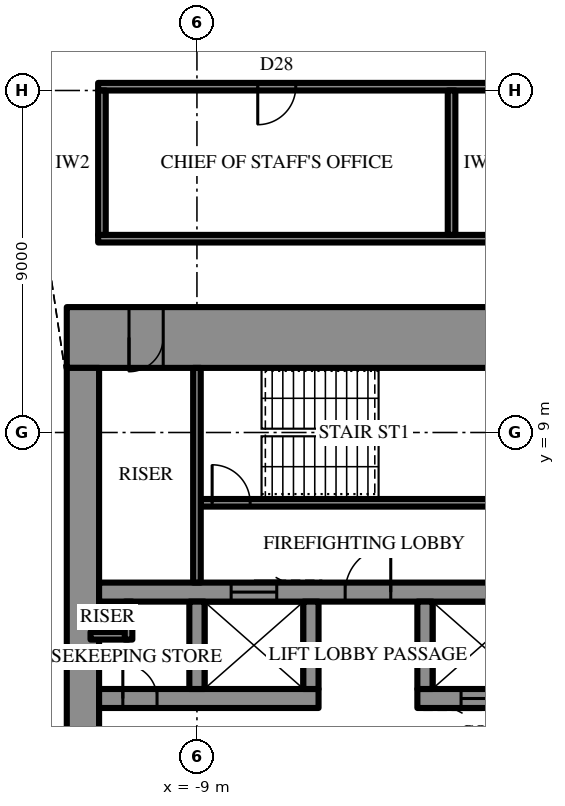
"""IFC4 building model, lengths in metres.
Left out: names, types, materials, properties, quantities, classifications, styles, units other than length and angle.
Written with IfcOpenShell. Run it as: python <this file> out.ifc"""

import sys

from ifc_helpers import new_model, si_unit, direction, frame, frame_2d, origin, place, context, subcontext, project, spatial, rectangle, extrude, element, fill, save


model = new_model("IFC4")
c1 = context("Model", 3, precision=1e-05, world=origin(), true_north=direction((0.0, 1.0)))
c2 = subcontext(c1, "Body", "Model", "MODEL_VIEW")
j1 = project(units=[si_unit("LENGTHUNIT", "METRE"), si_unit("PLANEANGLEUNIT", "RADIAN")], contexts=[c1])
p1 = place(None, origin())
s1 = spatial("IfcSite", under=j1, at=p1, CompositionType="ELEMENT")
p2 = place(p1, origin())
s2 = spatial("IfcBuilding", under=s1, at=p2, CompositionType="ELEMENT")
p3 = place(p2, frame((0.0, 0.0, 366.1)))
s3 = spatial("IfcBuildingStorey", under=s2, at=p3, CompositionType="ELEMENT", Elevation=366.1)
p4 = place(p3, frame((-12.425, 11.5, 0.0), z_axis=(0.0, 0.0, 1.0), x_axis=(1.0, 0.0, 0.0)))
e1 = element("IfcWall", 1, at=p4, inside=s3, PredefinedType="SHEAR", context=c2, shape_type="SweptSolid", body=[
    extrude(rectangle(XDim=24.85, YDim=1.6, at=frame_2d((12.425, 0.0))), origin(), (0.0, 0.0, 1.0), 4.2),
])
p5 = place(p4, frame((13.275, 0.0, 0.0)))
e2 = element("IfcOpeningElement", 2, at=p5, cuts=e1, PredefinedType="OPENING", context=c2, shape_type="SweptSolid", body=[
    extrude(rectangle(XDim=0.9, YDim=2.2, at=frame_2d((0.45, 1.1))), frame((0.0, 0.81, 0.0), z_axis=(0.0, -1.0, 0.0), x_axis=(1.0, 0.0, 0.0)), (0.0, 0.0, 1.0), 1.62),
])
p6 = place(p4, frame((16.275, 0.0, 0.0)))
e3 = element("IfcOpeningElement", 3, at=p6, cuts=e1, PredefinedType="OPENING", context=c2, shape_type="SweptSolid", body=[
    extrude(rectangle(XDim=0.9, YDim=2.2, at=frame_2d((0.45, 1.1))), frame((0.0, 0.81, 0.0), z_axis=(0.0, -1.0, 0.0), x_axis=(1.0, 0.0, 0.0)), (0.0, 0.0, 1.0), 1.62),
])
p7 = place(p4, frame((19.325, 0.0, 0.0)))
e4 = element("IfcOpeningElement", 4, at=p7, cuts=e1, PredefinedType="OPENING", context=c2, shape_type="SweptSolid", body=[
    extrude(rectangle(XDim=1.0, YDim=2.2, at=frame_2d((0.5, 1.1))), frame((0.0, 0.81, 0.0), z_axis=(0.0, -1.0, 0.0), x_axis=(1.0, 0.0, 0.0)), (0.0, 0.0, 1.0), 1.62),
])
p8 = place(p4, frame((1.637, 0.0, 0.0)))
e5 = element("IfcOpeningElement", 5, at=p8, cuts=e1, PredefinedType="OPENING", context=c2, shape_type="SweptSolid", body=[
    extrude(rectangle(XDim=0.9, YDim=2.2, at=frame_2d((0.45, 1.1))), frame((0.0, 0.81, 0.0), z_axis=(0.0, -1.0, 0.0), x_axis=(1.0, 0.0, 0.0)), (0.0, 0.0, 1.0), 1.62),
])
p9 = place(p4, frame((22.312, 0.0, 0.0)))
e6 = element("IfcOpeningElement", 6, at=p9, cuts=e1, PredefinedType="OPENING", context=c2, shape_type="SweptSolid", body=[
    extrude(rectangle(XDim=0.9, YDim=2.2, at=frame_2d((0.45, 1.1))), frame((0.0, 0.81, 0.0), z_axis=(0.0, -1.0, 0.0), x_axis=(1.0, 0.0, 0.0)), (0.0, 0.0, 1.0), 1.62),
])
p10 = place(p3, frame((-12.0, 10.7, 0.0), z_axis=(0.0, 0.0, 1.0), x_axis=(0.0, -1.0, 0.0)))
e7 = element("IfcWall", 7, at=p10, inside=s3, PredefinedType="SHEAR", context=c2, shape_type="SweptSolid", body=[
    extrude(rectangle(XDim=21.4, YDim=0.85, at=frame_2d((10.7, 0.0))), origin(), (0.0, 0.0, 1.0), 4.2),
])
p11 = place(p10, frame((9.8, 0.0, 0.0)))
e8 = element("IfcOpeningElement", 8, at=p11, cuts=e7, PredefinedType="OPENING", context=c2, shape_type="SweptSolid", body=[
    extrude(rectangle(XDim=1.8, YDim=2.4, at=frame_2d((0.9, 1.2))), frame((0.0, 0.435, 0.0), z_axis=(0.0, -1.0, 0.0), x_axis=(1.0, 0.0, 0.0)), (0.0, 0.0, 1.0), 0.87),
])
p12 = place(p3, frame((-11.575, 2.0, 0.0), z_axis=(0.0, 0.0, 1.0), x_axis=(1.0, 0.0, 0.0)))
e9 = element("IfcWall", 9, at=p12, inside=s3, PredefinedType="SHEAR", context=c2, shape_type="SweptSolid", body=[
    extrude(rectangle(XDim=5.775, YDim=0.5, at=frame_2d((2.887, 0.0))), origin(), (0.0, 0.0, 1.0), 4.2),
])
p13 = place(p12, frame((0.625, 0.0, 0.0)))
e10 = element("IfcOpeningElement", 10, at=p13, cuts=e9, PredefinedType="OPENING", context=c2, shape_type="SweptSolid", body=[
    extrude(rectangle(XDim=0.9, YDim=2.2, at=frame_2d((0.45, 1.1))), frame((0.0, 0.26, 0.0), z_axis=(0.0, -1.0, 0.0), x_axis=(1.0, 0.0, 0.0)), (0.0, 0.0, 1.0), 0.52),
])
p14 = place(p3, frame((-3.2, 2.0, 0.0), z_axis=(0.0, 0.0, 1.0), x_axis=(1.0, 0.0, 0.0)))
e11 = element("IfcWall", 11, at=p14, inside=s3, PredefinedType="SHEAR", context=c2, shape_type="SweptSolid", body=[
    extrude(rectangle(XDim=14.775, YDim=0.5, at=frame_2d((7.387, 0.0))), origin(), (0.0, 0.0, 1.0), 4.2),
])
p15 = place(p14, frame((13.25, 0.0, 0.0)))
e12 = element("IfcOpeningElement", 12, at=p15, cuts=e11, PredefinedType="OPENING", context=c2, shape_type="SweptSolid", body=[
    extrude(rectangle(XDim=0.9, YDim=2.2, at=frame_2d((0.45, 1.1))), frame((0.0, 0.26, 0.0), z_axis=(0.0, -1.0, 0.0), x_axis=(1.0, 0.0, 0.0)), (0.0, 0.0, 1.0), 0.52),
])
p16 = place(p14, frame((1.15, 0.0, 0.0)))
e13 = element("IfcOpeningElement", 13, at=p16, cuts=e11, PredefinedType="OPENING", context=c2, shape_type="SweptSolid", body=[
    extrude(rectangle(XDim=1.1, YDim=2.2, at=frame_2d((0.55, 1.1))), frame((0.0, 0.26, 0.0), z_axis=(0.0, -1.0, 0.0), x_axis=(1.0, 0.0, 0.0)), (0.0, 0.0, 1.0), 0.52),
])
p17 = place(p14, frame((4.15, 0.0, 0.0)))
e14 = element("IfcOpeningElement", 14, at=p17, cuts=e11, PredefinedType="OPENING", context=c2, shape_type="SweptSolid", body=[
    extrude(rectangle(XDim=1.1, YDim=2.2, at=frame_2d((0.55, 1.1))), frame((0.0, 0.26, 0.0), z_axis=(0.0, -1.0, 0.0), x_axis=(1.0, 0.0, 0.0)), (0.0, 0.0, 1.0), 0.52),
])
p18 = place(p14, frame((7.15, 0.0, 0.0)))
e15 = element("IfcOpeningElement", 15, at=p18, cuts=e11, PredefinedType="OPENING", context=c2, shape_type="SweptSolid", body=[
    extrude(rectangle(XDim=1.1, YDim=2.2, at=frame_2d((0.55, 1.1))), frame((0.0, 0.26, 0.0), z_axis=(0.0, -1.0, 0.0), x_axis=(1.0, 0.0, 0.0)), (0.0, 0.0, 1.0), 0.52),
])
p19 = place(p14, frame((10.15, 0.0, 0.0)))
e16 = element("IfcOpeningElement", 16, at=p19, cuts=e11, PredefinedType="OPENING", context=c2, shape_type="SweptSolid", body=[
    extrude(rectangle(XDim=1.1, YDim=2.2, at=frame_2d((0.55, 1.1))), frame((0.0, 0.26, 0.0), z_axis=(0.0, -1.0, 0.0), x_axis=(1.0, 0.0, 0.0)), (0.0, 0.0, 1.0), 0.52),
])
p20 = place(p3, frame((-11.575, 4.8, 0.0), z_axis=(0.0, 0.0, 1.0), x_axis=(1.0, 0.0, 0.0)))
e17 = element("IfcWall", 17, at=p20, inside=s3, PredefinedType="SHEAR", context=c2, shape_type="SweptSolid", body=[
    extrude(rectangle(XDim=23.15, YDim=0.5, at=frame_2d((11.575, 0.0))), origin(), (0.0, 0.0, 1.0), 4.2),
])
p21 = place(p20, frame((6.475, 0.0, 0.0)))
e18 = element("IfcOpeningElement", 18, at=p21, cuts=e17, PredefinedType="OPENING", context=c2, shape_type="SweptSolid", body=[
    extrude(rectangle(XDim=1.2, YDim=2.2, at=frame_2d((0.6, 1.1))), frame((0.0, 0.26, 0.0), z_axis=(0.0, -1.0, 0.0), x_axis=(1.0, 0.0, 0.0)), (0.0, 0.0, 1.0), 0.52),
])
p22 = place(p20, frame((3.475, 0.0, 0.0)))
e19 = element("IfcOpeningElement", 19, at=p22, cuts=e17, PredefinedType="OPENING", context=c2, shape_type="SweptSolid", body=[
    extrude(rectangle(XDim=1.2, YDim=2.2, at=frame_2d((0.6, 1.1))), frame((0.0, 0.26, 0.0), z_axis=(0.0, -1.0, 0.0), x_axis=(1.0, 0.0, 0.0)), (0.0, 0.0, 1.0), 0.52),
])
for number, where, z_axis, x_axis in (
    (20, (-9.0, 2.25, 0.0), (0.0, 0.0, 1.0), (0.0, 1.0, 0.0)),
    (21, (-6.0, 2.25, 0.0), (0.0, 0.0, 1.0), (0.0, 1.0, 0.0)),
    (22, (-3.0, 2.25, 0.0), (0.0, 0.0, 1.0), (0.0, 1.0, 0.0)),
):
    element("IfcWall", number, at=place(p3, frame(where, z_axis=z_axis, x_axis=x_axis)), inside=s3, PredefinedType="SHEAR", context=c2, shape_type="SweptSolid", body=[
        extrude(rectangle(XDim=2.3, YDim=0.4, at=frame_2d((1.15, 0.0))), origin(), (0.0, 0.0, 1.0), 4.2),
    ])
p23 = place(p3, frame((-8.9, 7.15, 0.0), z_axis=(0.0, 0.0, 1.0), x_axis=(1.0, 0.0, 0.0)))
e23 = element("IfcWall", 23, at=p23, inside=s3, PredefinedType="SHEAR", context=c2, shape_type="SweptSolid", body=[
    extrude(rectangle(XDim=8.6, YDim=0.2, at=frame_2d((4.3, 0.0))), origin(), (0.0, 0.0, 1.0), 4.2),
])
p24 = place(p23, frame((0.3, 0.0, 0.0)))
e24 = element("IfcOpeningElement", 24, at=p24, cuts=e23, PredefinedType="OPENING", context=c2, shape_type="SweptSolid", body=[
    extrude(rectangle(XDim=1.0, YDim=2.2, at=frame_2d((0.5, 1.1))), frame((0.0, 0.11, 0.0), z_axis=(0.0, -1.0, 0.0), x_axis=(1.0, 0.0, 0.0)), (0.0, 0.0, 1.0), 0.22),
])
p25 = place(p3, frame((-9.0, 5.05, 0.0), z_axis=(0.0, 0.0, 1.0), x_axis=(0.0, 1.0, 0.0)))
e25 = element("IfcWall", 25, at=p25, inside=s3, PredefinedType="PARTITIONING", context=c2, shape_type="SweptSolid", body=[
    extrude(rectangle(XDim=5.65, YDim=0.2, at=frame_2d((2.825, 0.0))), origin(), (0.0, 0.0, 1.0), 4.0),
])
for number, where, z_axis, x_axis in (
    (26, (-11.8, 3.65, 0.0), (0.0, 0.0, 1.0), (1.0, 0.0, 0.0)),
    (27, (-10.8, 3.55, 0.0), (0.0, 0.0, 1.0), (0.0, 1.0, 0.0)),
):
    element("IfcWall", number, at=place(p3, frame(where, z_axis=z_axis, x_axis=x_axis)), inside=s3, PredefinedType="PARTITIONING", context=c2, shape_type="SweptSolid", body=[
        extrude(rectangle(XDim=1.0, YDim=0.2, at=frame_2d((0.5, 0.0))), origin(), (0.0, 0.0, 1.0), 4.0),
    ])
p26 = place(p3, frame((-11.6, 14.1, 0.0), z_axis=(0.0, 0.0, 1.0), x_axis=(1.0, 0.0, 0.0)))
e28 = element("IfcWall", 28, at=p26, inside=s3, PredefinedType="PARTITIONING", context=c2, shape_type="SweptSolid", body=[
    extrude(rectangle(XDim=23.2, YDim=0.2, at=frame_2d((11.6, 0.0))), origin(), (0.0, 0.0, 1.0), 4.0),
])
p27 = place(p3, frame((-11.6, 18.1, 0.0), z_axis=(0.0, 0.0, 1.0), x_axis=(1.0, 0.0, 0.0)))
e29 = element("IfcWall", 29, at=p27, inside=s3, PredefinedType="PARTITIONING", context=c2, shape_type="SweptSolid", body=[
    extrude(rectangle(XDim=23.2, YDim=0.2, at=frame_2d((11.6, 0.0))), origin(), (0.0, 0.0, 1.0), 4.0),
])
p28 = place(p27, frame((4.2, 0.0, 0.0)))
e30 = element("IfcOpeningElement", 30, at=p28, cuts=e29, PredefinedType="OPENING", context=c2, shape_type="SweptSolid", body=[
    extrude(rectangle(XDim=1.0, YDim=2.2, at=frame_2d((0.5, 1.1))), frame((0.0, 0.11, 0.0), z_axis=(0.0, -1.0, 0.0), x_axis=(1.0, 0.0, 0.0)), (0.0, 0.0, 1.0), 0.22),
])
p29 = place(p27, frame((13.4, 0.0, 0.0)))
e31 = element("IfcOpeningElement", 31, at=p29, cuts=e29, PredefinedType="OPENING", context=c2, shape_type="SweptSolid", body=[
    extrude(rectangle(XDim=1.0, YDim=2.2, at=frame_2d((0.5, 1.1))), frame((0.0, 0.11, 0.0), z_axis=(0.0, -1.0, 0.0), x_axis=(1.0, 0.0, 0.0)), (0.0, 0.0, 1.0), 0.22),
])
p30 = place(p27, frame((20.3, 0.0, 0.0)))
e32 = element("IfcOpeningElement", 32, at=p30, cuts=e29, PredefinedType="OPENING", context=c2, shape_type="SweptSolid", body=[
    extrude(rectangle(XDim=1.0, YDim=2.2, at=frame_2d((0.5, 1.1))), frame((0.0, 0.11, 0.0), z_axis=(0.0, -1.0, 0.0), x_axis=(1.0, 0.0, 0.0)), (0.0, 0.0, 1.0), 0.22),
])
for number, where, z_axis, x_axis in (
    (33, (-11.5, 14.2, 0.0), (0.0, 0.0, 1.0), (0.0, 1.0, 0.0)),
    (34, (-2.3, 14.2, 0.0), (0.0, 0.0, 1.0), (0.0, 1.0, 0.0)),
):
    element("IfcWall", number, at=place(p3, frame(where, z_axis=z_axis, x_axis=x_axis)), inside=s3, PredefinedType="PARTITIONING", context=c2, shape_type="SweptSolid", body=[
        extrude(rectangle(XDim=3.8, YDim=0.2, at=frame_2d((1.9, 0.0))), origin(), (0.0, 0.0, 1.0), 4.0),
    ])
p31 = place(p21, origin())
e35 = element("IfcDoor", 35, at=p31, inside=s3, OperationType="SINGLE_SWING_LEFT", PredefinedType="DOOR", context=c2, shape_type="SweptSolid", body=[
    extrude(rectangle(XDim=1.2, YDim=2.2, at=frame_2d((0.6, 1.1))), frame((0.0, 0.025, 0.0), z_axis=(0.0, -1.0, 0.0), x_axis=(1.0, 0.0, 0.0)), (0.0, 0.0, 1.0), 0.05),
])
fill(e18, e35)
p32 = place(p24, origin())
e36 = element("IfcDoor", 36, at=p32, inside=s3, OperationType="SINGLE_SWING_RIGHT", PredefinedType="DOOR", context=c2, shape_type="SweptSolid", body=[
    extrude(rectangle(XDim=1.0, YDim=2.2, at=frame_2d((0.5, 1.1))), frame((0.0, 0.025, 0.0), z_axis=(0.0, -1.0, 0.0), x_axis=(1.0, 0.0, 0.0)), (0.0, 0.0, 1.0), 0.05),
])
fill(e24, e36)
p33 = place(p8, frame((0.9, 0.0, 0.0), z_axis=(0.0, 0.0, 1.0), x_axis=(-1.0, 0.0, 0.0)))
e37 = element("IfcDoor", 37, at=p33, inside=s3, OperationType="SINGLE_SWING_LEFT", PredefinedType="DOOR", context=c2, shape_type="SweptSolid", body=[
    extrude(rectangle(XDim=0.9, YDim=2.2, at=frame_2d((0.45, 1.1))), frame((0.0, 0.025, 0.0), z_axis=(0.0, -1.0, 0.0), x_axis=(1.0, 0.0, 0.0)), (0.0, 0.0, 1.0), 0.05),
])
fill(e5, e37)
p34 = place(p13, origin())
e38 = element("IfcDoor", 38, at=p34, inside=s3, OperationType="SINGLE_SWING_RIGHT", PredefinedType="DOOR", context=c2, shape_type="SweptSolid", body=[
    extrude(rectangle(XDim=0.9, YDim=2.2, at=frame_2d((0.45, 1.1))), frame((0.0, 0.025, 0.0), z_axis=(0.0, -1.0, 0.0), x_axis=(1.0, 0.0, 0.0)), (0.0, 0.0, 1.0), 0.05),
])
fill(e10, e38)
p35 = place(p22, origin())
e39 = element("IfcDoor", 39, at=p35, inside=s3, OperationType="SLIDING_TO_LEFT", PredefinedType="DOOR", context=c2, shape_type="SweptSolid", body=[
    extrude(rectangle(XDim=1.2, YDim=2.2, at=frame_2d((0.6, 1.1))), frame((0.0, 0.025, 0.0), z_axis=(0.0, -1.0, 0.0), x_axis=(1.0, 0.0, 0.0)), (0.0, 0.0, 1.0), 0.05),
])
fill(e19, e39)
p36 = place(p16, frame((1.1, 0.0, 0.0), z_axis=(0.0, 0.0, 1.0), x_axis=(-1.0, 0.0, 0.0)))
e40 = element("IfcDoor", 40, at=p36, inside=s3, OperationType="SLIDING_TO_LEFT", PredefinedType="DOOR", context=c2, shape_type="SweptSolid", body=[
    extrude(rectangle(XDim=1.1, YDim=2.2, at=frame_2d((0.55, 1.1))), frame((0.0, 0.025, 0.0), z_axis=(0.0, -1.0, 0.0), x_axis=(1.0, 0.0, 0.0)), (0.0, 0.0, 1.0), 0.05),
])
fill(e13, e40)
p37 = place(p28, frame((1.0, 0.0, 0.0), z_axis=(0.0, 0.0, 1.0), x_axis=(-1.0, 0.0, 0.0)))
e41 = element("IfcDoor", 41, at=p37, inside=s3, OperationType="SINGLE_SWING_LEFT", PredefinedType="DOOR", context=c2, shape_type="SweptSolid", body=[
    extrude(rectangle(XDim=1.0, YDim=2.2, at=frame_2d((0.5, 1.1))), frame((0.0, 0.025, 0.0), z_axis=(0.0, -1.0, 0.0), x_axis=(1.0, 0.0, 0.0)), (0.0, 0.0, 1.0), 0.05),
])
fill(e30, e41)
save(model, sys.argv[1])
